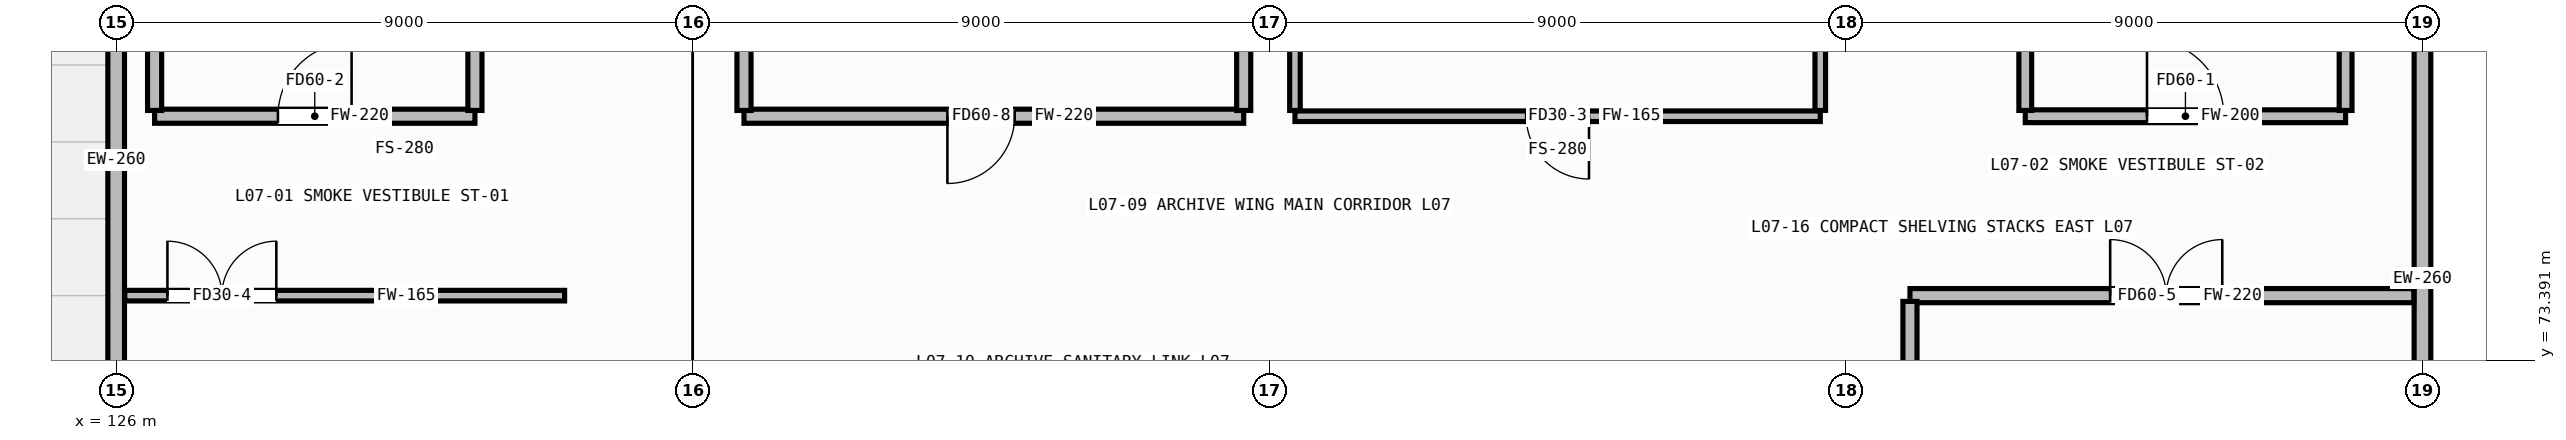
"""IFC4 building model, lengths in metres.
Left out: names, types, materials, properties, quantities, classifications, styles, units other than length and angle.
Written with IfcOpenShell. Run it as: python <this file> out.ifc"""

import sys

from ifc_helpers import new_model, si_unit, direction, frame, frame_2d, origin, place, context, subcontext, project, spatial, rectangle, extrude, element, fill, save


model = new_model("IFC4")
c1 = context("Model", 3, precision=1e-05, world=origin(), true_north=direction((0.0, 1.0)))
c2 = subcontext(c1, "Body", "Model", "MODEL_VIEW")
j1 = project(units=[si_unit("LENGTHUNIT", "METRE"), si_unit("PLANEANGLEUNIT", "RADIAN")], contexts=[c1])
p1 = place(None, origin())
s1 = spatial("IfcSite", under=j1, at=p1, CompositionType="ELEMENT")
p2 = place(p1, origin())
s2 = spatial("IfcBuilding", under=s1, at=p2, CompositionType="ELEMENT")
p3 = place(p2, frame((0.0, 0.0, 24.2)))
s3 = spatial("IfcBuildingStorey", under=s2, at=p3, CompositionType="ELEMENT", Elevation=24.2)
p4 = place(p3, frame((126.0, 72.3, 0.0), z_axis=(0.0, 0.0, 1.0), x_axis=(0.0, 1.0, 0.0)))
e1 = element("IfcWall", 1, at=p4, inside=s3, PredefinedType="STANDARD", context=c2, shape_type="SweptSolid", body=[
    extrude(rectangle(XDim=6.6, YDim=0.26, at=frame_2d((3.3, 0.0))), origin(), (0.0, 0.0, 1.0), 2.92),
])
p5 = place(p3, frame((162.0, 78.925, 0.0), z_axis=(0.0, 0.0, 1.0), x_axis=(0.0, -1.0, 0.0)))
e2 = element("IfcWall", 2, at=p5, inside=s3, PredefinedType="STANDARD", context=c2, shape_type="SweptSolid", body=[
    extrude(rectangle(XDim=6.65, YDim=0.26, at=frame_2d((3.325, 0.0))), origin(), (0.0, 0.0, 1.0), 2.92),
])
p6 = place(p3, frame((126.6, 77.2, 0.0), z_axis=(0.0, 0.0, 1.0), x_axis=(1.0, 0.0, 0.0)))
e3 = element("IfcWall", 3, at=p6, inside=s3, PredefinedType="PARTITIONING", context=c2, shape_type="SweptSolid", body=[
    extrude(rectangle(XDim=5.0, YDim=0.22, at=frame_2d((2.5, 0.0))), origin(), (0.0, 0.0, 1.0), 3.32),
])
p7 = place(p6, frame((1.925, 0.0, 0.0)))
e4 = element("IfcOpeningElement", 4, at=p7, cuts=e3, PredefinedType="OPENING", context=c2, shape_type="SweptSolid", body=[
    extrude(rectangle(XDim=1.15, YDim=2.1, at=frame_2d((0.575, 1.05))), frame((0.0, 0.122, 0.0), z_axis=(0.0, -1.0, 0.0), x_axis=(1.0, 0.0, 0.0)), (0.0, 0.0, 1.0), 0.244),
])
for number, where, z_axis, x_axis in (
    (5, (126.6, 77.29, 0.0), (0.0, 0.0, 1.0), (0.0, 1.0, 0.0)),
    (6, (131.6, 77.29, 0.0), (0.0, 0.0, 1.0), (0.0, 1.0, 0.0)),
):
    element("IfcWall", number, at=place(p3, frame(where, z_axis=z_axis, x_axis=x_axis)), inside=s3, PredefinedType="PARTITIONING", context=c2, shape_type="SweptSolid", body=[
        extrude(rectangle(XDim=3.82, YDim=0.22, at=frame_2d((1.91, 0.0))), origin(), (0.0, 0.0, 1.0), 3.32),
    ])
p8 = place(p3, frame((155.8, 77.2, 0.0), z_axis=(0.0, 0.0, 1.0), x_axis=(1.0, 0.0, 0.0)))
e7 = element("IfcWall", 7, at=p8, inside=s3, PredefinedType="PARTITIONING", context=c2, shape_type="SweptSolid", body=[
    extrude(rectangle(XDim=5.0, YDim=0.2, at=frame_2d((2.5, 0.0))), origin(), (0.0, 0.0, 1.0), 3.32),
])
p9 = place(p8, frame((1.9, 0.0, 0.0)))
e8 = element("IfcOpeningElement", 8, at=p9, cuts=e7, PredefinedType="OPENING", context=c2, shape_type="SweptSolid", body=[
    extrude(rectangle(XDim=1.2, YDim=2.1, at=frame_2d((0.6, 1.05))), frame((0.0, 0.112, 0.0), z_axis=(0.0, -1.0, 0.0), x_axis=(1.0, 0.0, 0.0)), (0.0, 0.0, 1.0), 0.224),
])
for number, where, z_axis, x_axis in (
    (9, (155.8, 77.29, 0.0), (0.0, 0.0, 1.0), (0.0, 1.0, 0.0)),
    (10, (160.8, 77.29, 0.0), (0.0, 0.0, 1.0), (0.0, 1.0, 0.0)),
):
    element("IfcWall", number, at=place(p3, frame(where, z_axis=z_axis, x_axis=x_axis)), inside=s3, PredefinedType="PARTITIONING", context=c2, shape_type="SweptSolid", body=[
        extrude(rectangle(XDim=3.82, YDim=0.2, at=frame_2d((1.91, 0.0))), origin(), (0.0, 0.0, 1.0), 3.32),
    ])
p10 = place(p3, frame((135.8, 77.2, 0.0), z_axis=(0.0, 0.0, 1.0), x_axis=(1.0, 0.0, 0.0)))
e11 = element("IfcWall", 11, at=p10, inside=s3, PredefinedType="PARTITIONING", context=c2, shape_type="SweptSolid", body=[
    extrude(rectangle(XDim=7.8, YDim=0.22, at=frame_2d((3.9, 0.0))), origin(), (0.0, 0.0, 1.0), 3.32),
])
p11 = place(p10, frame((3.175, 0.0, 0.0)))
e12 = element("IfcOpeningElement", 12, at=p11, cuts=e11, PredefinedType="OPENING", context=c2, shape_type="SweptSolid", body=[
    extrude(rectangle(XDim=1.05, YDim=2.02, at=frame_2d((0.525, 1.01))), frame((0.0, 0.122, 0.0), z_axis=(0.0, -1.0, 0.0), x_axis=(1.0, 0.0, 0.0)), (0.0, 0.0, 1.0), 0.244),
])
for number, where, z_axis, x_axis in (
    (13, (135.8, 77.29, 0.0), (0.0, 0.0, 1.0), (0.0, 1.0, 0.0)),
    (14, (143.6, 77.29, 0.0), (0.0, 0.0, 1.0), (0.0, 1.0, 0.0)),
):
    element("IfcWall", number, at=place(p3, frame(where, z_axis=z_axis, x_axis=x_axis)), inside=s3, PredefinedType="PARTITIONING", context=c2, shape_type="SweptSolid", body=[
        extrude(rectangle(XDim=3.82, YDim=0.22, at=frame_2d((1.91, 0.0))), origin(), (0.0, 0.0, 1.0), 3.32),
    ])
p12 = place(p3, frame((144.4, 77.2, 0.0), z_axis=(0.0, 0.0, 1.0), x_axis=(1.0, 0.0, 0.0)))
e15 = element("IfcWall", 15, at=p12, inside=s3, PredefinedType="PARTITIONING", context=c2, shape_type="SweptSolid", body=[
    extrude(rectangle(XDim=8.2, YDim=0.165, at=frame_2d((4.1, 0.0))), origin(), (0.0, 0.0, 1.0), 3.32),
])
p13 = place(p12, frame((3.61, 0.0, 0.0)))
e16 = element("IfcOpeningElement", 16, at=p13, cuts=e15, PredefinedType="OPENING", context=c2, shape_type="SweptSolid", body=[
    extrude(rectangle(XDim=0.98, YDim=2.02, at=frame_2d((0.49, 1.01))), frame((0.0, 0.094, 0.0), z_axis=(0.0, -1.0, 0.0), x_axis=(1.0, 0.0, 0.0)), (0.0, 0.0, 1.0), 0.189),
])
for number, where, z_axis, x_axis in (
    (17, (144.4, 77.29, 0.0), (0.0, 0.0, 1.0), (0.0, 1.0, 0.0)),
    (18, (152.6, 77.29, 0.0), (0.0, 0.0, 1.0), (0.0, 1.0, 0.0)),
):
    element("IfcWall", number, at=place(p3, frame(where, z_axis=z_axis, x_axis=x_axis)), inside=s3, PredefinedType="PARTITIONING", context=c2, shape_type="SweptSolid", body=[
        extrude(rectangle(XDim=3.82, YDim=0.165, at=frame_2d((1.91, 0.0))), origin(), (0.0, 0.0, 1.0), 3.32),
    ])
p14 = place(p3, frame((126.135, 74.4, 0.0), z_axis=(0.0, 0.0, 1.0), x_axis=(1.0, 0.0, 0.0)))
e19 = element("IfcWall", 19, at=p14, inside=s3, PredefinedType="PARTITIONING", context=c2, shape_type="SweptSolid", body=[
    extrude(rectangle(XDim=6.865, YDim=0.165, at=frame_2d((3.433, 0.0))), origin(), (0.0, 0.0, 1.0), 3.32),
])
p15 = place(p14, frame((0.665, 0.0, 0.0)))
e20 = element("IfcOpeningElement", 20, at=p15, cuts=e19, PredefinedType="OPENING", context=c2, shape_type="SweptSolid", body=[
    extrude(rectangle(XDim=1.7, YDim=2.12, at=frame_2d((0.85, 1.06))), frame((0.0, 0.094, 0.0), z_axis=(0.0, -1.0, 0.0), x_axis=(1.0, 0.0, 0.0)), (0.0, 0.0, 1.0), 0.189),
])
p16 = place(p3, frame((154.0, 74.4, 0.0), z_axis=(0.0, 0.0, 1.0), x_axis=(1.0, 0.0, 0.0)))
e21 = element("IfcWall", 21, at=p16, inside=s3, PredefinedType="PARTITIONING", context=c2, shape_type="SweptSolid", body=[
    extrude(rectangle(XDim=7.865, YDim=0.22, at=frame_2d((3.933, 0.0))), origin(), (0.0, 0.0, 1.0), 3.32),
])
p17 = place(p16, frame((3.125, 0.0, 0.0)))
e22 = element("IfcOpeningElement", 22, at=p17, cuts=e21, PredefinedType="OPENING", context=c2, shape_type="SweptSolid", body=[
    extrude(rectangle(XDim=1.75, YDim=2.12, at=frame_2d((0.875, 1.06))), frame((0.0, 0.122, 0.0), z_axis=(0.0, -1.0, 0.0), x_axis=(1.0, 0.0, 0.0)), (0.0, 0.0, 1.0), 0.244),
])
p18 = place(p3, frame((154.0, 65.49, 0.0), z_axis=(0.0, 0.0, 1.0), x_axis=(0.0, 1.0, 0.0)))
e23 = element("IfcWall", 23, at=p18, inside=s3, PredefinedType="PARTITIONING", context=c2, shape_type="SweptSolid", body=[
    extrude(rectangle(XDim=8.82, YDim=0.22, at=frame_2d((4.41, 0.0))), origin(), (0.0, 0.0, 1.0), 3.32),
])
p19 = place(p7, origin())
e24 = element("IfcDoor", 24, at=p19, inside=s3, OperationType="SINGLE_SWING_RIGHT", PredefinedType="DOOR", context=c2, shape_type="SweptSolid", body=[
    extrude(rectangle(XDim=1.15, YDim=2.1, at=frame_2d((0.575, 1.05))), frame((0.0, 0.025, 0.0), z_axis=(0.0, -1.0, 0.0), x_axis=(1.0, 0.0, 0.0)), (0.0, 0.0, 1.0), 0.05),
])
fill(e4, e24)
p20 = place(p9, origin())
e25 = element("IfcDoor", 25, at=p20, inside=s3, OperationType="SINGLE_SWING_LEFT", PredefinedType="DOOR", context=c2, shape_type="SweptSolid", body=[
    extrude(rectangle(XDim=1.2, YDim=2.1, at=frame_2d((0.6, 1.05))), frame((0.0, 0.025, 0.0), z_axis=(0.0, -1.0, 0.0), x_axis=(1.0, 0.0, 0.0)), (0.0, 0.0, 1.0), 0.05),
])
fill(e8, e25)
p21 = place(p11, frame((1.05, 0.0, 0.0), z_axis=(0.0, 0.0, 1.0), x_axis=(-1.0, 0.0, 0.0)))
e26 = element("IfcDoor", 26, at=p21, inside=s3, OperationType="SINGLE_SWING_RIGHT", PredefinedType="DOOR", context=c2, shape_type="SweptSolid", body=[
    extrude(rectangle(XDim=1.05, YDim=2.02, at=frame_2d((0.525, 1.01))), frame((0.0, 0.025, 0.0), z_axis=(0.0, -1.0, 0.0), x_axis=(1.0, 0.0, 0.0)), (0.0, 0.0, 1.0), 0.05),
])
fill(e12, e26)
p22 = place(p13, frame((0.98, 0.0, 0.0), z_axis=(0.0, 0.0, 1.0), x_axis=(-1.0, 0.0, 0.0)))
e27 = element("IfcDoor", 27, at=p22, inside=s3, OperationType="SINGLE_SWING_LEFT", PredefinedType="DOOR", context=c2, shape_type="SweptSolid", body=[
    extrude(rectangle(XDim=0.98, YDim=2.02, at=frame_2d((0.49, 1.01))), frame((0.0, 0.025, 0.0), z_axis=(0.0, -1.0, 0.0), x_axis=(1.0, 0.0, 0.0)), (0.0, 0.0, 1.0), 0.05),
])
fill(e16, e27)
p23 = place(p15, origin())
e28 = element("IfcDoor", 28, at=p23, inside=s3, OperationType="DOUBLE_DOOR_SINGLE_SWING", PredefinedType="DOOR", context=c2, shape_type="SweptSolid", body=[
    extrude(rectangle(XDim=1.7, YDim=2.12, at=frame_2d((0.85, 1.06))), frame((0.0, 0.025, 0.0), z_axis=(0.0, -1.0, 0.0), x_axis=(1.0, 0.0, 0.0)), (0.0, 0.0, 1.0), 0.05),
])
fill(e20, e28)
p24 = place(p17, origin())
e29 = element("IfcDoor", 29, at=p24, inside=s3, OperationType="DOUBLE_DOOR_SINGLE_SWING", PredefinedType="DOOR", context=c2, shape_type="SweptSolid", body=[
    extrude(rectangle(XDim=1.75, YDim=2.12, at=frame_2d((0.875, 1.06))), frame((0.0, 0.025, 0.0), z_axis=(0.0, -1.0, 0.0), x_axis=(1.0, 0.0, 0.0)), (0.0, 0.0, 1.0), 0.05),
])
fill(e22, e29)
save(model, sys.argv[1])
